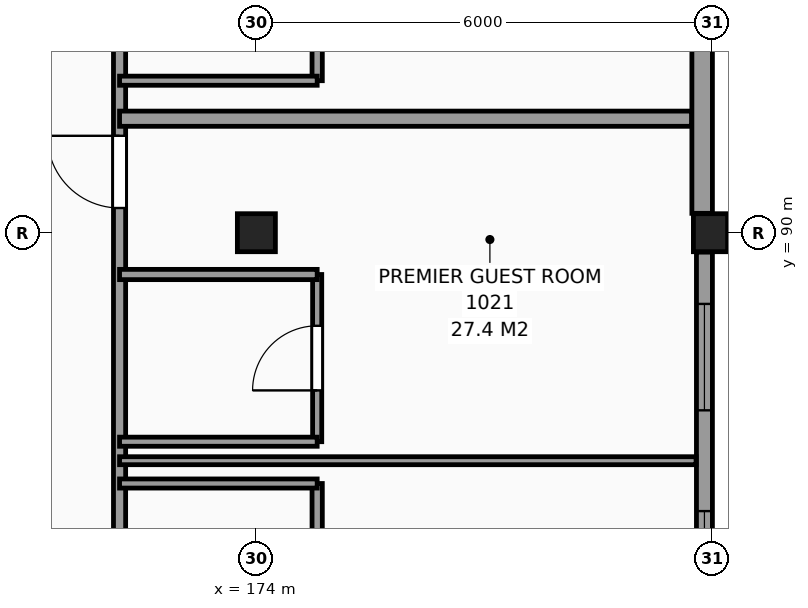
"""IFC4 building model, lengths in metres.
Left out: names, types, materials, properties, quantities, classifications, styles, units other than length and angle.
Written with IfcOpenShell. Run it as: python <this file> out.ifc"""

import sys

from ifc_helpers import new_model, si_unit, direction, frame, frame_2d, origin, origin_2d, place, context, subcontext, project, spatial, rectangle, extrude, element, fill, save


model = new_model("IFC4")
c1 = context("Model", 3, precision=1e-05, world=origin(), true_north=direction((0.0, 1.0)))
c2 = subcontext(c1, "Body", "Model", "MODEL_VIEW")
j1 = project(units=[si_unit("LENGTHUNIT", "METRE"), si_unit("PLANEANGLEUNIT", "RADIAN")], contexts=[c1])
p1 = place(None, origin())
s1 = spatial("IfcSite", under=j1, at=p1, CompositionType="ELEMENT")
p2 = place(p1, origin())
s2 = spatial("IfcBuilding", under=s1, at=p2, CompositionType="ELEMENT")
p3 = place(p2, frame((0.0, 0.0, 41.4)))
s3 = spatial("IfcBuildingStorey", under=s2, at=p3, CompositionType="ELEMENT", Elevation=41.4)
for number, where, z_axis, x_axis in (
    (1, (174.0, 90.0, 0.0), (0.0, 0.0, 1.0), (1.0, 0.0, 0.0)),
    (2, (180.0, 90.0, 0.0), (0.0, 0.0, 1.0), (1.0, 0.0, 0.0)),
):
    element("IfcColumn", number, at=place(p3, frame(where, z_axis=z_axis, x_axis=x_axis)), inside=s3, PredefinedType="COLUMN", context=c2, shape_type="SweptSolid", body=[
        extrude(rectangle(XDim=0.5, YDim=0.5, at=origin_2d()), origin(), (0.0, 0.0, 1.0), 3.3),
    ])
p4 = place(p3, frame((179.895, 84.255, 0.0), z_axis=(0.0, 0.0, 1.0), x_axis=(0.0, 1.0, 0.0)))
e3 = element("IfcWall", 3, at=p4, inside=s3, PredefinedType="SOLIDWALL", context=c2, shape_type="SweptSolid", body=[
    extrude(rectangle(XDim=5.49, YDim=0.21, at=frame_2d((2.745, 0.0))), origin(), (0.0, 0.0, 1.0), 2.41),
])
p5 = place(p4, frame((0.682, 0.0, 0.8)))
e4 = element("IfcOpeningElement", 4, at=p5, cuts=e3, PredefinedType="OPENING", context=c2, shape_type="SweptSolid", body=[
    extrude(rectangle(XDim=1.4, YDim=1.4, at=frame_2d((0.7, 0.7))), frame((0.0, 0.115, 0.0), z_axis=(0.0, -1.0, 0.0), x_axis=(1.0, 0.0, 0.0)), (0.0, 0.0, 1.0), 0.23),
])
p6 = place(p4, frame((3.408, 0.0, 0.8)))
e5 = element("IfcOpeningElement", 5, at=p6, cuts=e3, PredefinedType="OPENING", context=c2, shape_type="SweptSolid", body=[
    extrude(rectangle(XDim=1.4, YDim=1.4, at=frame_2d((0.7, 0.7))), frame((0.0, 0.115, 0.0), z_axis=(0.0, -1.0, 0.0), x_axis=(1.0, 0.0, 0.0)), (0.0, 0.0, 1.0), 0.23),
])
p7 = place(p3, frame((179.865, 90.255, 0.0), z_axis=(0.0, 0.0, 1.0), x_axis=(0.0, 1.0, 0.0)))
e6 = element("IfcWall", 6, at=p7, inside=s3, PredefinedType="SOLIDWALL", context=c2, shape_type="SweptSolid", body=[
    extrude(rectangle(XDim=5.49, YDim=0.27, at=frame_2d((2.745, 0.0))), origin(), (0.0, 0.0, 1.0), 2.41),
])
p8 = place(p7, frame((2.658, 0.0, 0.8)))
e7 = element("IfcOpeningElement", 7, at=p8, cuts=e6, PredefinedType="OPENING", context=c2, shape_type="SweptSolid", body=[
    extrude(rectangle(XDim=1.4, YDim=1.4, at=frame_2d((0.7, 0.7))), frame((0.0, 0.145, 0.0), z_axis=(0.0, -1.0, 0.0), x_axis=(1.0, 0.0, 0.0)), (0.0, 0.0, 1.0), 0.29),
])
p9 = place(p3, frame((172.2, 42.275, 0.0), z_axis=(0.0, 0.0, 1.0), x_axis=(0.0, 1.0, 0.0)))
e8 = element("IfcWall", 8, at=p9, inside=s3, PredefinedType="PARTITIONING", context=c2, shape_type="SweptSolid", body=[
    extrude(rectangle(XDim=65.545, YDim=0.16, at=frame_2d((32.772, 0.0))), origin(), (0.0, 0.0, 1.0), 3.06),
])
p10 = place(p9, frame((0.4, 0.0, 0.0)))
e9 = element("IfcOpeningElement", 9, at=p10, cuts=e8, PredefinedType="OPENING", context=c2, shape_type="SweptSolid", body=[
    extrude(rectangle(XDim=0.95, YDim=2.1, at=frame_2d((0.475, 1.05))), frame((0.0, 0.09, 0.0), z_axis=(0.0, -1.0, 0.0), x_axis=(1.0, 0.0, 0.0)), (0.0, 0.0, 1.0), 0.18),
])
p11 = place(p9, frame((4.85, 0.0, 0.0)))
e10 = element("IfcOpeningElement", 10, at=p11, cuts=e8, PredefinedType="OPENING", context=c2, shape_type="SweptSolid", body=[
    extrude(rectangle(XDim=0.95, YDim=2.1, at=frame_2d((0.475, 1.05))), frame((0.0, 0.09, 0.0), z_axis=(0.0, -1.0, 0.0), x_axis=(1.0, 0.0, 0.0)), (0.0, 0.0, 1.0), 0.18),
])
p12 = place(p9, frame((9.35, 0.0, 0.0)))
e11 = element("IfcOpeningElement", 11, at=p12, cuts=e8, PredefinedType="OPENING", context=c2, shape_type="SweptSolid", body=[
    extrude(rectangle(XDim=0.95, YDim=2.1, at=frame_2d((0.475, 1.05))), frame((0.0, 0.09, 0.0), z_axis=(0.0, -1.0, 0.0), x_axis=(1.0, 0.0, 0.0)), (0.0, 0.0, 1.0), 0.18),
])
p13 = place(p9, frame((18.45, 0.0, 0.0)))
e12 = element("IfcOpeningElement", 12, at=p13, cuts=e8, PredefinedType="OPENING", context=c2, shape_type="SweptSolid", body=[
    extrude(rectangle(XDim=0.95, YDim=2.1, at=frame_2d((0.475, 1.05))), frame((0.0, 0.09, 0.0), z_axis=(0.0, -1.0, 0.0), x_axis=(1.0, 0.0, 0.0)), (0.0, 0.0, 1.0), 0.18),
])
p14 = place(p9, frame((22.85, 0.0, 0.0)))
e13 = element("IfcOpeningElement", 13, at=p14, cuts=e8, PredefinedType="OPENING", context=c2, shape_type="SweptSolid", body=[
    extrude(rectangle(XDim=0.95, YDim=2.1, at=frame_2d((0.475, 1.05))), frame((0.0, 0.09, 0.0), z_axis=(0.0, -1.0, 0.0), x_axis=(1.0, 0.0, 0.0)), (0.0, 0.0, 1.0), 0.18),
])
p15 = place(p9, frame((30.05, 0.0, 0.0)))
e14 = element("IfcOpeningElement", 14, at=p15, cuts=e8, PredefinedType="OPENING", context=c2, shape_type="SweptSolid", body=[
    extrude(rectangle(XDim=0.95, YDim=2.1, at=frame_2d((0.475, 1.05))), frame((0.0, 0.09, 0.0), z_axis=(0.0, -1.0, 0.0), x_axis=(1.0, 0.0, 0.0)), (0.0, 0.0, 1.0), 0.18),
])
p16 = place(p9, frame((38.3, 0.0, 0.0)))
e15 = element("IfcOpeningElement", 15, at=p16, cuts=e8, PredefinedType="OPENING", context=c2, shape_type="SweptSolid", body=[
    extrude(rectangle(XDim=0.95, YDim=2.1, at=frame_2d((0.475, 1.05))), frame((0.0, 0.09, 0.0), z_axis=(0.0, -1.0, 0.0), x_axis=(1.0, 0.0, 0.0)), (0.0, 0.0, 1.0), 0.18),
])
p17 = place(p9, frame((40.85, 0.0, 0.0)))
e16 = element("IfcOpeningElement", 16, at=p17, cuts=e8, PredefinedType="OPENING", context=c2, shape_type="SweptSolid", body=[
    extrude(rectangle(XDim=0.95, YDim=2.1, at=frame_2d((0.475, 1.05))), frame((0.0, 0.09, 0.0), z_axis=(0.0, -1.0, 0.0), x_axis=(1.0, 0.0, 0.0)), (0.0, 0.0, 1.0), 0.18),
])
p18 = place(p9, frame((48.05, 0.0, 0.0)))
e17 = element("IfcOpeningElement", 17, at=p18, cuts=e8, PredefinedType="OPENING", context=c2, shape_type="SweptSolid", body=[
    extrude(rectangle(XDim=0.95, YDim=2.1, at=frame_2d((0.475, 1.05))), frame((0.0, 0.09, 0.0), z_axis=(0.0, -1.0, 0.0), x_axis=(1.0, 0.0, 0.0)), (0.0, 0.0, 1.0), 0.18),
])
p19 = place(p9, frame((52.25, 0.0, 0.0)))
e18 = element("IfcOpeningElement", 18, at=p19, cuts=e8, PredefinedType="OPENING", context=c2, shape_type="SweptSolid", body=[
    extrude(rectangle(XDim=0.95, YDim=2.1, at=frame_2d((0.475, 1.05))), frame((0.0, 0.09, 0.0), z_axis=(0.0, -1.0, 0.0), x_axis=(1.0, 0.0, 0.0)), (0.0, 0.0, 1.0), 0.18),
])
p20 = place(p9, frame((54.45, 0.0, 0.0)))
e19 = element("IfcOpeningElement", 19, at=p20, cuts=e8, PredefinedType="OPENING", context=c2, shape_type="SweptSolid", body=[
    extrude(rectangle(XDim=0.95, YDim=2.1, at=frame_2d((0.475, 1.05))), frame((0.0, 0.09, 0.0), z_axis=(0.0, -1.0, 0.0), x_axis=(1.0, 0.0, 0.0)), (0.0, 0.0, 1.0), 0.18),
])
p21 = place(p9, frame((60.45, 0.0, 0.0)))
e20 = element("IfcOpeningElement", 20, at=p21, cuts=e8, PredefinedType="OPENING", context=c2, shape_type="SweptSolid", body=[
    extrude(rectangle(XDim=0.95, YDim=2.1, at=frame_2d((0.475, 1.05))), frame((0.0, 0.09, 0.0), z_axis=(0.0, -1.0, 0.0), x_axis=(1.0, 0.0, 0.0)), (0.0, 0.0, 1.0), 0.18),
])
p22 = place(p3, frame((174.8, 84.5, 0.0), z_axis=(0.0, 0.0, 1.0), x_axis=(0.0, 1.0, 0.0)))
e21 = element("IfcWall", 21, at=p22, inside=s3, PredefinedType="PARTITIONING", context=c2, shape_type="SweptSolid", body=[
    extrude(rectangle(XDim=2.2, YDim=0.135, at=frame_2d((1.1, 0.0))), origin(), (0.0, 0.0, 1.0), 3.06),
])
p23 = place(p22, frame((0.675, 0.0, 0.0)))
e22 = element("IfcOpeningElement", 22, at=p23, cuts=e21, PredefinedType="OPENING", context=c2, shape_type="SweptSolid", body=[
    extrude(rectangle(XDim=0.85, YDim=2.1, at=frame_2d((0.425, 1.05))), frame((0.0, 0.078, 0.0), z_axis=(0.0, -1.0, 0.0), x_axis=(1.0, 0.0, 0.0)), (0.0, 0.0, 1.0), 0.155),
])
p24 = place(p3, frame((174.8, 87.25, 0.0), z_axis=(0.0, 0.0, 1.0), x_axis=(0.0, 1.0, 0.0)))
e23 = element("IfcWall", 23, at=p24, inside=s3, PredefinedType="PARTITIONING", context=c2, shape_type="SweptSolid", body=[
    extrude(rectangle(XDim=2.2, YDim=0.12, at=frame_2d((1.1, 0.0))), origin(), (0.0, 0.0, 1.0), 3.06),
])
p25 = place(p24, frame((0.675, 0.0, 0.0)))
e24 = element("IfcOpeningElement", 24, at=p25, cuts=e23, PredefinedType="OPENING", context=c2, shape_type="SweptSolid", body=[
    extrude(rectangle(XDim=0.85, YDim=2.1, at=frame_2d((0.425, 1.05))), frame((0.0, 0.07, 0.0), z_axis=(0.0, -1.0, 0.0), x_axis=(1.0, 0.0, 0.0)), (0.0, 0.0, 1.0), 0.14),
])
p26 = place(p3, frame((174.8, 92.0, 0.0), z_axis=(0.0, 0.0, 1.0), x_axis=(0.0, 1.0, 0.0)))
e25 = element("IfcWall", 25, at=p26, inside=s3, PredefinedType="PARTITIONING", context=c2, shape_type="SweptSolid", body=[
    extrude(rectangle(XDim=2.2, YDim=0.135, at=frame_2d((1.1, 0.0))), origin(), (0.0, 0.0, 1.0), 3.06),
])
p27 = place(p26, frame((0.675, 0.0, 0.0)))
e26 = element("IfcOpeningElement", 26, at=p27, cuts=e25, PredefinedType="OPENING", context=c2, shape_type="SweptSolid", body=[
    extrude(rectangle(XDim=0.85, YDim=2.1, at=frame_2d((0.425, 1.05))), frame((0.0, 0.078, 0.0), z_axis=(0.0, -1.0, 0.0), x_axis=(1.0, 0.0, 0.0)), (0.0, 0.0, 1.0), 0.155),
])
p28 = place(p3, frame((172.2, 86.7, 0.0), z_axis=(0.0, 0.0, 1.0), x_axis=(1.0, 0.0, 0.0)))
e27 = element("IfcWall", 27, at=p28, inside=s3, PredefinedType="PARTITIONING", context=c2, shape_type="SweptSolid", body=[
    extrude(rectangle(XDim=2.6, YDim=0.12, at=frame_2d((1.3, 0.0))), origin(), (0.0, 0.0, 1.0), 3.06),
])
p29 = place(p3, frame((172.2, 87.0, 0.0), z_axis=(0.0, 0.0, 1.0), x_axis=(1.0, 0.0, 0.0)))
e28 = element("IfcWall", 28, at=p29, inside=s3, PredefinedType="PARTITIONING", context=c2, shape_type="SweptSolid", body=[
    extrude(rectangle(XDim=7.585, YDim=0.105, at=frame_2d((3.792, 0.0))), origin(), (0.0, 0.0, 1.0), 3.06),
])
p30 = place(p3, frame((172.2, 87.25, 0.0), z_axis=(0.0, 0.0, 1.0), x_axis=(1.0, 0.0, 0.0)))
e29 = element("IfcWall", 29, at=p30, inside=s3, PredefinedType="PARTITIONING", context=c2, shape_type="SweptSolid", body=[
    extrude(rectangle(XDim=2.6, YDim=0.12, at=frame_2d((1.3, 0.0))), origin(), (0.0, 0.0, 1.0), 3.06),
])
p31 = place(p3, frame((172.2, 89.45, 0.0), z_axis=(0.0, 0.0, 1.0), x_axis=(1.0, 0.0, 0.0)))
e30 = element("IfcWall", 30, at=p31, inside=s3, PredefinedType="PARTITIONING", context=c2, shape_type="SweptSolid", body=[
    extrude(rectangle(XDim=2.6, YDim=0.135, at=frame_2d((1.3, 0.0))), origin(), (0.0, 0.0, 1.0), 3.06),
])
p32 = place(p3, frame((172.2, 91.5, 0.0), z_axis=(0.0, 0.0, 1.0), x_axis=(1.0, 0.0, 0.0)))
e31 = element("IfcWall", 31, at=p32, inside=s3, PredefinedType="PARTITIONING", context=c2, shape_type="SweptSolid", body=[
    extrude(rectangle(XDim=7.525, YDim=0.2, at=frame_2d((3.763, 0.0))), origin(), (0.0, 0.0, 1.0), 3.06),
])
p33 = place(p3, frame((172.2, 92.0, 0.0), z_axis=(0.0, 0.0, 1.0), x_axis=(1.0, 0.0, 0.0)))
e32 = element("IfcWall", 32, at=p33, inside=s3, PredefinedType="PARTITIONING", context=c2, shape_type="SweptSolid", body=[
    extrude(rectangle(XDim=2.6, YDim=0.12, at=frame_2d((1.3, 0.0))), origin(), (0.0, 0.0, 1.0), 3.06),
])
p34 = place(p5, origin())
e33 = element("IfcWindow", 33, at=p34, inside=s3, PartitioningType="SINGLE_PANEL", PredefinedType="WINDOW", context=c2, shape_type="SweptSolid", body=[
    extrude(rectangle(XDim=1.4, YDim=1.4, at=frame_2d((0.7, 0.7))), frame((0.0, 0.03, 0.0), z_axis=(0.0, -1.0, 0.0), x_axis=(1.0, 0.0, 0.0)), (0.0, 0.0, 1.0), 0.06),
])
fill(e4, e33)
p35 = place(p6, origin())
e34 = element("IfcWindow", 34, at=p35, inside=s3, PartitioningType="SINGLE_PANEL", PredefinedType="WINDOW", context=c2, shape_type="SweptSolid", body=[
    extrude(rectangle(XDim=1.4, YDim=1.4, at=frame_2d((0.7, 0.7))), frame((0.0, 0.03, 0.0), z_axis=(0.0, -1.0, 0.0), x_axis=(1.0, 0.0, 0.0)), (0.0, 0.0, 1.0), 0.06),
])
fill(e5, e34)
p36 = place(p25, origin())
e35 = element("IfcDoor", 35, at=p36, inside=s3, OperationType="SINGLE_SWING_LEFT", PredefinedType="DOOR", context=c2, shape_type="SweptSolid", body=[
    extrude(rectangle(XDim=0.85, YDim=2.1, at=frame_2d((0.425, 1.05))), frame((0.0, 0.025, 0.0), z_axis=(0.0, -1.0, 0.0), x_axis=(1.0, 0.0, 0.0)), (0.0, 0.0, 1.0), 0.05),
])
fill(e24, e35)
p37 = place(p18, origin())
e36 = element("IfcDoor", 36, at=p37, inside=s3, OperationType="SINGLE_SWING_RIGHT", PredefinedType="DOOR", context=c2, shape_type="SweptSolid", body=[
    extrude(rectangle(XDim=0.95, YDim=2.1, at=frame_2d((0.475, 1.05))), frame((0.0, 0.025, 0.0), z_axis=(0.0, -1.0, 0.0), x_axis=(1.0, 0.0, 0.0)), (0.0, 0.0, 1.0), 0.05),
])
fill(e17, e36)
save(model, sys.argv[1])
